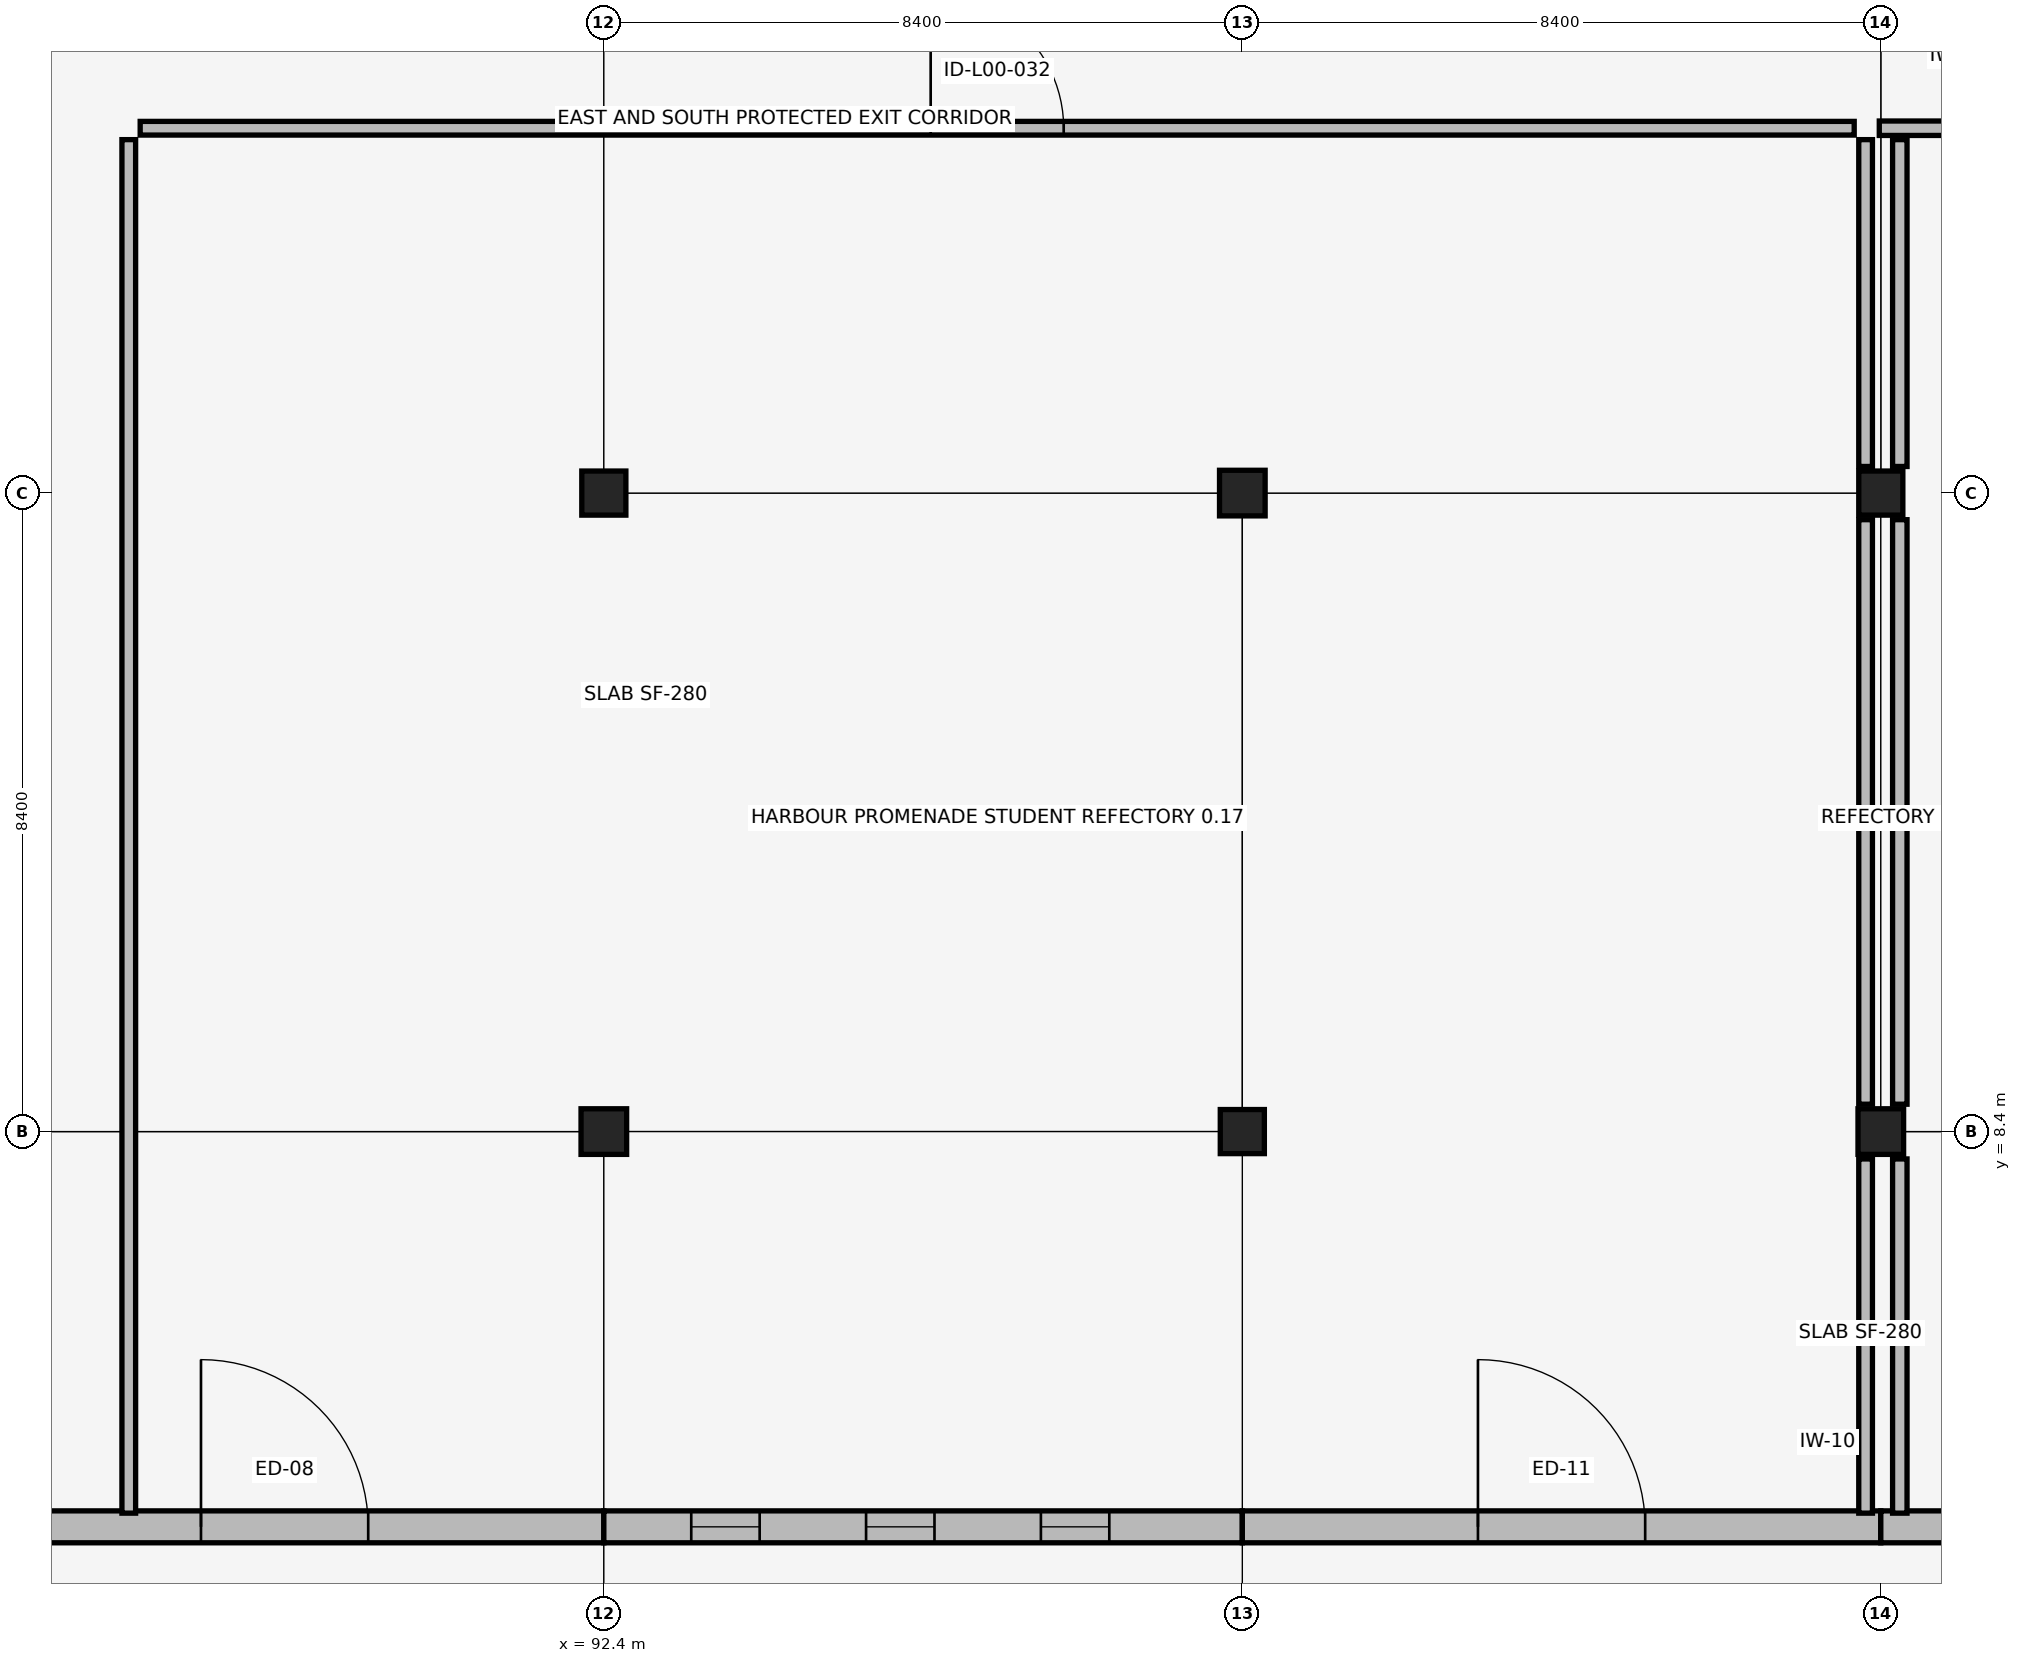
"""IFC4 building model, lengths in metres.
Left out: names, types, materials, properties, quantities, classifications, styles, units other than length and angle.
Written with IfcOpenShell. Run it as: python <this file> out.ifc"""

import sys

from ifc_helpers import new_model, si_unit, direction, frame, frame_2d, origin, origin_2d, place, context, subcontext, project, spatial, rectangle, extrude, element, fill, save


model = new_model("IFC4")
c1 = context("Model", 3, precision=1e-05, world=origin(), true_north=direction((0.0, 1.0)))
c2 = subcontext(c1, "Body", "Model", "MODEL_VIEW")
j1 = project(units=[si_unit("LENGTHUNIT", "METRE"), si_unit("PLANEANGLEUNIT", "RADIAN")], contexts=[c1])
p1 = place(None, origin())
s1 = spatial("IfcSite", under=j1, at=p1, CompositionType="ELEMENT")
p2 = place(p1, origin())
s2 = spatial("IfcBuilding", under=s1, at=p2, CompositionType="ELEMENT")
p3 = place(p2, origin())
s3 = spatial("IfcBuildingStorey", under=s2, at=p3, CompositionType="ELEMENT", Elevation=0.0)
p4 = place(p3, frame((92.4, 8.4, 0.0), z_axis=(0.0, 0.0, 1.0), x_axis=(1.0, 0.0, 0.0)))
e1 = element("IfcColumn", 1, at=p4, inside=s3, PredefinedType="COLUMN", context=c2, shape_type="SweptSolid", body=[
    extrude(rectangle(XDim=0.6, YDim=0.6, at=origin_2d()), origin(), (0.0, 0.0, 1.0), 5.14),
])
for number, where, z_axis, x_axis in (
    (2, (92.4, 16.8, 0.0), (0.0, 0.0, 1.0), (1.0, 0.0, 0.0)),
    (3, (100.8, 8.4, 0.0), (0.0, 0.0, 1.0), (1.0, 0.0, 0.0)),
):
    element("IfcColumn", number, at=place(p3, frame(where, z_axis=z_axis, x_axis=x_axis)), inside=s3, PredefinedType="COLUMN", context=c2, shape_type="SweptSolid", body=[
        extrude(rectangle(XDim=0.58, YDim=0.58, at=origin_2d()), origin(), (0.0, 0.0, 1.0), 5.14),
    ])
for number, where, z_axis, x_axis in (
    (4, (100.8, 16.8, 0.0), (0.0, 0.0, 1.0), (1.0, 0.0, 0.0)),
    (5, (109.2, 8.4, 0.0), (0.0, 0.0, 1.0), (1.0, 0.0, 0.0)),
):
    element("IfcColumn", number, at=place(p3, frame(where, z_axis=z_axis, x_axis=x_axis)), inside=s3, PredefinedType="COLUMN", context=c2, shape_type="SweptSolid", body=[
        extrude(rectangle(XDim=0.6, YDim=0.6, at=origin_2d()), origin(), (0.0, 0.0, 1.0), 5.14),
    ])
p5 = place(p3, frame((109.2, 16.8, 0.0), z_axis=(0.0, 0.0, 1.0), x_axis=(1.0, 0.0, 0.0)))
e6 = element("IfcColumn", 6, at=p5, inside=s3, PredefinedType="COLUMN", context=c2, shape_type="SweptSolid", body=[
    extrude(rectangle(XDim=0.58, YDim=0.58, at=origin_2d()), origin(), (0.0, 0.0, 1.0), 5.14),
])
p6 = place(p3, frame((84.0, 3.2, 0.0), z_axis=(0.0, 0.0, 1.0), x_axis=(1.0, 0.0, 0.0)))
e7 = element("IfcWall", 7, at=p6, inside=s3, PredefinedType="SOLIDWALL", context=c2, shape_type="SweptSolid", body=[
    extrude(rectangle(XDim=8.4, YDim=0.42, at=frame_2d((4.2, 0.0))), origin(), (0.0, 0.0, 1.0), 4.49),
])
p7 = place(p6, frame((3.1, 0.0, 0.0)))
e8 = element("IfcOpeningElement", 8, at=p7, cuts=e7, PredefinedType="OPENING", context=c2, shape_type="SweptSolid", body=[
    extrude(rectangle(XDim=2.2, YDim=2.4, at=frame_2d((1.1, 1.2))), frame((0.0, 0.22, 0.0), z_axis=(0.0, -1.0, 0.0), x_axis=(1.0, 0.0, 0.0)), (0.0, 0.0, 1.0), 0.44),
])
p8 = place(p3, frame((92.4, 3.2, 0.0), z_axis=(0.0, 0.0, 1.0), x_axis=(1.0, 0.0, 0.0)))
e9 = element("IfcWall", 9, at=p8, inside=s3, PredefinedType="SOLIDWALL", context=c2, shape_type="SweptSolid", body=[
    extrude(rectangle(XDim=8.4, YDim=0.42, at=frame_2d((4.2, 0.0))), origin(), (0.0, 0.0, 1.0), 4.49),
])
p9 = place(p8, frame((1.15, 0.0, 0.85)))
e10 = element("IfcOpeningElement", 10, at=p9, cuts=e9, PredefinedType="OPENING", context=c2, shape_type="SweptSolid", body=[
    extrude(rectangle(XDim=0.9, YDim=3.0, at=frame_2d((0.45, 1.5))), frame((0.0, 0.22, 0.0), z_axis=(0.0, -1.0, 0.0), x_axis=(1.0, 0.0, 0.0)), (0.0, 0.0, 1.0), 0.44),
])
p10 = place(p8, frame((3.45, 0.0, 0.85)))
e11 = element("IfcOpeningElement", 11, at=p10, cuts=e9, PredefinedType="OPENING", context=c2, shape_type="SweptSolid", body=[
    extrude(rectangle(XDim=0.9, YDim=3.0, at=frame_2d((0.45, 1.5))), frame((0.0, 0.22, 0.0), z_axis=(0.0, -1.0, 0.0), x_axis=(1.0, 0.0, 0.0)), (0.0, 0.0, 1.0), 0.44),
])
p11 = place(p8, frame((5.75, 0.0, 0.85)))
e12 = element("IfcOpeningElement", 12, at=p11, cuts=e9, PredefinedType="OPENING", context=c2, shape_type="SweptSolid", body=[
    extrude(rectangle(XDim=0.9, YDim=3.0, at=frame_2d((0.45, 1.5))), frame((0.0, 0.22, 0.0), z_axis=(0.0, -1.0, 0.0), x_axis=(1.0, 0.0, 0.0)), (0.0, 0.0, 1.0), 0.44),
])
p12 = place(p3, frame((100.8, 3.2, 0.0), z_axis=(0.0, 0.0, 1.0), x_axis=(1.0, 0.0, 0.0)))
e13 = element("IfcWall", 13, at=p12, inside=s3, PredefinedType="SOLIDWALL", context=c2, shape_type="SweptSolid", body=[
    extrude(rectangle(XDim=8.4, YDim=0.42, at=frame_2d((4.2, 0.0))), origin(), (0.0, 0.0, 1.0), 4.49),
])
p13 = place(p12, frame((3.1, 0.0, 0.0)))
e14 = element("IfcOpeningElement", 14, at=p13, cuts=e13, PredefinedType="OPENING", context=c2, shape_type="SweptSolid", body=[
    extrude(rectangle(XDim=2.2, YDim=2.4, at=frame_2d((1.1, 1.2))), frame((0.0, 0.22, 0.0), z_axis=(0.0, -1.0, 0.0), x_axis=(1.0, 0.0, 0.0)), (0.0, 0.0, 1.0), 0.44),
])
p14 = place(p3, frame((109.2, 3.2, 0.0), z_axis=(0.0, 0.0, 1.0), x_axis=(1.0, 0.0, 0.0)))
e15 = element("IfcWall", 15, at=p14, inside=s3, PredefinedType="SOLIDWALL", context=c2, shape_type="SweptSolid", body=[
    extrude(rectangle(XDim=8.4, YDim=0.42, at=frame_2d((4.2, 0.0))), origin(), (0.0, 0.0, 1.0), 4.49),
])
p15 = place(p14, frame((1.15, 0.0, 0.85)))
e16 = element("IfcOpeningElement", 16, at=p15, cuts=e15, PredefinedType="OPENING", context=c2, shape_type="SweptSolid", body=[
    extrude(rectangle(XDim=0.9, YDim=3.0, at=frame_2d((0.45, 1.5))), frame((0.0, 0.22, 0.0), z_axis=(0.0, -1.0, 0.0), x_axis=(1.0, 0.0, 0.0)), (0.0, 0.0, 1.0), 0.44),
])
p16 = place(p14, frame((3.45, 0.0, 0.85)))
e17 = element("IfcOpeningElement", 17, at=p16, cuts=e15, PredefinedType="OPENING", context=c2, shape_type="SweptSolid", body=[
    extrude(rectangle(XDim=0.9, YDim=3.0, at=frame_2d((0.45, 1.5))), frame((0.0, 0.22, 0.0), z_axis=(0.0, -1.0, 0.0), x_axis=(1.0, 0.0, 0.0)), (0.0, 0.0, 1.0), 0.44),
])
p17 = place(p14, frame((5.75, 0.0, 0.85)))
e18 = element("IfcOpeningElement", 18, at=p17, cuts=e15, PredefinedType="OPENING", context=c2, shape_type="SweptSolid", body=[
    extrude(rectangle(XDim=0.9, YDim=3.0, at=frame_2d((0.45, 1.5))), frame((0.0, 0.22, 0.0), z_axis=(0.0, -1.0, 0.0), x_axis=(1.0, 0.0, 0.0)), (0.0, 0.0, 1.0), 0.44),
])
p18 = place(p3, frame((86.3, 21.6, 0.0), z_axis=(0.0, 0.0, 1.0), x_axis=(1.0, 0.0, 0.0)))
e19 = element("IfcWall", 19, at=p18, inside=s3, PredefinedType="PARTITIONING", context=c2, shape_type="SweptSolid", body=[
    extrude(rectangle(XDim=22.55, YDim=0.18, at=frame_2d((11.275, 0.0))), origin(), (0.0, 0.0, 1.0), 4.49),
])
p19 = place(p18, frame((10.4, 0.0, 0.0)))
e20 = element("IfcOpeningElement", 20, at=p19, cuts=e19, PredefinedType="OPENING", context=c2, shape_type="SweptSolid", body=[
    extrude(rectangle(XDim=1.75, YDim=2.3, at=frame_2d((0.875, 1.15))), frame((0.0, 0.1, 0.0), z_axis=(0.0, -1.0, 0.0), x_axis=(1.0, 0.0, 0.0)), (0.0, 0.0, 1.0), 0.2),
])
p20 = place(p3, frame((86.15, 3.38, 0.0), z_axis=(0.0, 0.0, 1.0), x_axis=(0.0, 1.0, 0.0)))
e21 = element("IfcWall", 21, at=p20, inside=s3, PredefinedType="PARTITIONING", context=c2, shape_type="SweptSolid", body=[
    extrude(rectangle(XDim=18.07, YDim=0.18, at=frame_2d((9.035, 0.0))), origin(), (0.0, 0.0, 1.0), 4.36),
])
p21 = place(p3, frame((109.0, 3.38, 0.0), z_axis=(0.0, 0.0, 1.0), x_axis=(0.0, 1.0, 0.0)))
e22 = element("IfcWall", 22, at=p21, inside=s3, PredefinedType="PARTITIONING", context=c2, shape_type="SweptSolid", body=[
    extrude(rectangle(XDim=4.66, YDim=0.18, at=frame_2d((2.33, 0.0))), origin(), (0.0, 0.0, 1.0), 4.59),
])
p22 = place(p3, frame((109.0, 8.76, 0.0), z_axis=(0.0, 0.0, 1.0), x_axis=(0.0, 1.0, 0.0)))
e23 = element("IfcWall", 23, at=p22, inside=s3, PredefinedType="PARTITIONING", context=c2, shape_type="SweptSolid", body=[
    extrude(rectangle(XDim=7.69, YDim=0.18, at=frame_2d((3.845, 0.0))), origin(), (0.0, 0.0, 1.0), 4.58),
])
p23 = place(p3, frame((109.0, 17.15, 0.0), z_axis=(0.0, 0.0, 1.0), x_axis=(0.0, 1.0, 0.0)))
e24 = element("IfcWall", 24, at=p23, inside=s3, PredefinedType="PARTITIONING", context=c2, shape_type="SweptSolid", body=[
    extrude(rectangle(XDim=4.3, YDim=0.18, at=frame_2d((2.15, 0.0))), origin(), (0.0, 0.0, 1.0), 4.59),
])
p24 = place(p3, frame((109.18, 21.6, 0.0), z_axis=(0.0, 0.0, 1.0), x_axis=(1.0, 0.0, 0.0)))
e25 = element("IfcWall", 25, at=p24, inside=s3, PredefinedType="PARTITIONING", context=c2, shape_type="SweptSolid", body=[
    extrude(rectangle(XDim=16.47, YDim=0.19, at=frame_2d((8.235, 0.0))), origin(), (0.0, 0.0, 1.0), 4.49),
])
p25 = place(p24, frame((7.61, 0.0, 0.0)))
e26 = element("IfcOpeningElement", 26, at=p25, cuts=e25, PredefinedType="OPENING", context=c2, shape_type="SweptSolid", body=[
    extrude(rectangle(XDim=1.25, YDim=2.15, at=frame_2d((0.625, 1.075))), frame((0.0, 0.105, 0.0), z_axis=(0.0, -1.0, 0.0), x_axis=(1.0, 0.0, 0.0)), (0.0, 0.0, 1.0), 0.21),
])
p26 = place(p3, frame((109.45, 3.38, 0.0), z_axis=(0.0, 0.0, 1.0), x_axis=(0.0, 1.0, 0.0)))
e27 = element("IfcWall", 27, at=p26, inside=s3, PredefinedType="PARTITIONING", context=c2, shape_type="SweptSolid", body=[
    extrude(rectangle(XDim=4.66, YDim=0.19, at=frame_2d((2.33, 0.0))), origin(), (0.0, 0.0, 1.0), 4.58),
])
p27 = place(p3, frame((109.45, 8.76, 0.0), z_axis=(0.0, 0.0, 1.0), x_axis=(0.0, 1.0, 0.0)))
e28 = element("IfcWall", 28, at=p27, inside=s3, PredefinedType="PARTITIONING", context=c2, shape_type="SweptSolid", body=[
    extrude(rectangle(XDim=7.69, YDim=0.19, at=frame_2d((3.845, 0.0))), origin(), (0.0, 0.0, 1.0), 4.59),
])
p28 = place(p3, frame((109.45, 17.15, 0.0), z_axis=(0.0, 0.0, 1.0), x_axis=(0.0, 1.0, 0.0)))
e29 = element("IfcWall", 29, at=p28, inside=s3, PredefinedType="PARTITIONING", context=c2, shape_type="SweptSolid", body=[
    extrude(rectangle(XDim=4.3, YDim=0.19, at=frame_2d((2.15, 0.0))), origin(), (0.0, 0.0, 1.0), 4.58),
])
p29 = place(p7, origin())
e30 = element("IfcDoor", 30, at=p29, inside=s3, OperationType="DOUBLE_DOOR_SINGLE_SWING", PredefinedType="DOOR", context=c2, shape_type="SweptSolid", body=[
    extrude(rectangle(XDim=2.2, YDim=2.4, at=frame_2d((1.1, 1.2))), frame((0.0, 0.025, 0.0), z_axis=(0.0, -1.0, 0.0), x_axis=(1.0, 0.0, 0.0)), (0.0, 0.0, 1.0), 0.05),
])
fill(e8, e30)
p30 = place(p9, origin())
e31 = element("IfcWindow", 31, at=p30, inside=s3, PartitioningType="DOUBLE_PANEL_VERTICAL", PredefinedType="WINDOW", context=c2, shape_type="SweptSolid", body=[
    extrude(rectangle(XDim=0.9, YDim=3.0, at=frame_2d((0.45, 1.5))), frame((0.0, 0.03, 0.0), z_axis=(0.0, -1.0, 0.0), x_axis=(1.0, 0.0, 0.0)), (0.0, 0.0, 1.0), 0.06),
])
fill(e10, e31)
p31 = place(p10, origin())
e32 = element("IfcWindow", 32, at=p31, inside=s3, PartitioningType="DOUBLE_PANEL_VERTICAL", PredefinedType="WINDOW", context=c2, shape_type="SweptSolid", body=[
    extrude(rectangle(XDim=0.9, YDim=3.0, at=frame_2d((0.45, 1.5))), frame((0.0, 0.03, 0.0), z_axis=(0.0, -1.0, 0.0), x_axis=(1.0, 0.0, 0.0)), (0.0, 0.0, 1.0), 0.06),
])
fill(e11, e32)
p32 = place(p11, origin())
e33 = element("IfcWindow", 33, at=p32, inside=s3, PartitioningType="DOUBLE_PANEL_VERTICAL", PredefinedType="WINDOW", context=c2, shape_type="SweptSolid", body=[
    extrude(rectangle(XDim=0.9, YDim=3.0, at=frame_2d((0.45, 1.5))), frame((0.0, 0.03, 0.0), z_axis=(0.0, -1.0, 0.0), x_axis=(1.0, 0.0, 0.0)), (0.0, 0.0, 1.0), 0.06),
])
fill(e12, e33)
p33 = place(p13, origin())
e34 = element("IfcDoor", 34, at=p33, inside=s3, OperationType="DOUBLE_DOOR_SINGLE_SWING", PredefinedType="DOOR", context=c2, shape_type="SweptSolid", body=[
    extrude(rectangle(XDim=2.2, YDim=2.4, at=frame_2d((1.1, 1.2))), frame((0.0, 0.025, 0.0), z_axis=(0.0, -1.0, 0.0), x_axis=(1.0, 0.0, 0.0)), (0.0, 0.0, 1.0), 0.05),
])
fill(e14, e34)
p34 = place(p19, origin())
e35 = element("IfcDoor", 35, at=p34, inside=s3, OperationType="DOUBLE_DOOR_SINGLE_SWING", PredefinedType="DOOR", context=c2, shape_type="SweptSolid", body=[
    extrude(rectangle(XDim=1.75, YDim=2.3, at=frame_2d((0.875, 1.15))), frame((0.0, 0.025, 0.0), z_axis=(0.0, -1.0, 0.0), x_axis=(1.0, 0.0, 0.0)), (0.0, 0.0, 1.0), 0.05),
])
fill(e20, e35)
save(model, sys.argv[1])
